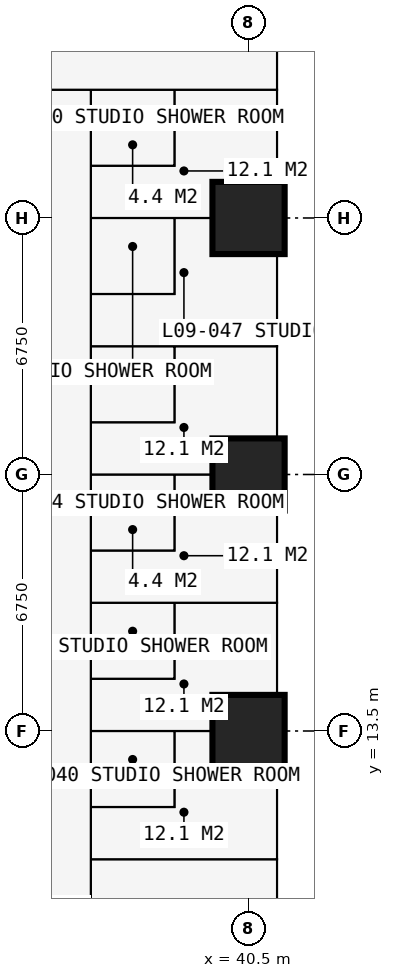
"""IFC4 building model, lengths in metres.
Left out: names, types, materials, properties, quantities, classifications, styles, units other than length and angle.
Written with IfcOpenShell. Run it as: python <this file> out.ifc"""

import sys

from ifc_helpers import new_model, si_unit, direction, frame, frame_2d, origin, origin_2d, place, context, subcontext, project, spatial, rectangle, extrude, element, fill, save


model = new_model("IFC4")
c1 = context("Model", 3, precision=1e-05, world=origin(), true_north=direction((0.0, 1.0)))
c2 = subcontext(c1, "Body", "Model", "MODEL_VIEW")
j1 = project(units=[si_unit("LENGTHUNIT", "METRE"), si_unit("PLANEANGLEUNIT", "RADIAN")], contexts=[c1])
p1 = place(None, origin())
s1 = spatial("IfcSite", under=j1, at=p1, CompositionType="ELEMENT")
p2 = place(p1, origin())
s2 = spatial("IfcBuilding", under=s1, at=p2, CompositionType="ELEMENT")
p3 = place(p2, frame((0.0, 0.0, 36.0)))
s3 = spatial("IfcBuildingStorey", under=s2, at=p3, CompositionType="ELEMENT", Elevation=36.0)
for number, where, z_axis, x_axis in (
    (1, (40.5, 13.5, 0.0), (0.0, 0.0, 1.0), (1.0, 0.0, 0.0)),
    (2, (40.5, 20.25, 0.0), (0.0, 0.0, 1.0), (1.0, 0.0, 0.0)),
    (3, (40.5, 27.0, 0.0), (0.0, 0.0, 1.0), (1.0, 0.0, 0.0)),
):
    element("IfcColumn", number, at=place(p3, frame(where, z_axis=z_axis, x_axis=x_axis)), inside=s3, PredefinedType="COLUMN", context=c2, shape_type="SweptSolid", body=[
        extrude(rectangle(XDim=1.9, YDim=1.9, at=origin_2d()), origin(), (0.0, 0.0, 1.0), 3.6),
    ])
p4 = place(p3, frame((41.25, 27.0, 0.0), z_axis=(0.0, 0.0, 1.0), x_axis=(0.0, -1.0, 0.0)))
e4 = element("IfcWall", 4, at=p4, inside=s3, PredefinedType="SOLIDWALL", context=c2, shape_type="SweptSolid", body=[
    extrude(rectangle(XDim=6.75, YDim=0.15, at=frame_2d((3.375, 0.0))), origin(), (0.0, 0.0, 1.0), 3.375),
])
p5 = place(p4, frame((0.996, 0.0, 0.0)))
e5 = element("IfcOpeningElement", 5, at=p5, cuts=e4, PredefinedType="OPENING", context=c2, shape_type="SweptSolid", body=[
    extrude(rectangle(XDim=1.0, YDim=2.2, at=frame_2d((0.5, 1.1))), frame((0.0, 0.085, 0.0), z_axis=(0.0, -1.0, 0.0), x_axis=(1.0, 0.0, 0.0)), (0.0, 0.0, 1.0), 0.17),
])
p6 = place(p4, frame((2.042, 0.0, 0.9)))
e6 = element("IfcOpeningElement", 6, at=p6, cuts=e4, PredefinedType="OPENING", context=c2, shape_type="SweptSolid", body=[
    extrude(rectangle(XDim=1.2, YDim=1.8, at=frame_2d((0.6, 0.9))), frame((0.0, 0.085, 0.0), z_axis=(0.0, -1.0, 0.0), x_axis=(1.0, 0.0, 0.0)), (0.0, 0.0, 1.0), 0.17),
])
p7 = place(p4, frame((4.754, 0.0, 0.0)))
e7 = element("IfcOpeningElement", 7, at=p7, cuts=e4, PredefinedType="OPENING", context=c2, shape_type="SweptSolid", body=[
    extrude(rectangle(XDim=1.0, YDim=2.2, at=frame_2d((0.5, 1.1))), frame((0.0, 0.085, 0.0), z_axis=(0.0, -1.0, 0.0), x_axis=(1.0, 0.0, 0.0)), (0.0, 0.0, 1.0), 0.17),
])
p8 = place(p4, frame((3.508, 0.0, 0.9)))
e8 = element("IfcOpeningElement", 8, at=p8, cuts=e4, PredefinedType="OPENING", context=c2, shape_type="SweptSolid", body=[
    extrude(rectangle(XDim=1.2, YDim=1.8, at=frame_2d((0.6, 0.9))), frame((0.0, 0.085, 0.0), z_axis=(0.0, -1.0, 0.0), x_axis=(1.0, 0.0, 0.0)), (0.0, 0.0, 1.0), 0.17),
])
p9 = place(p3, frame((41.35, 23.625, 0.0), z_axis=(0.0, 0.0, 1.0), x_axis=(1.0, 0.0, 0.0)))
e9 = element("IfcWall", 9, at=p9, inside=s3, PredefinedType="USERDEFINED", context=c2, shape_type="SweptSolid", body=[
    extrude(rectangle(XDim=2.2, YDim=1.0, at=frame_2d((1.1, 0.0))), origin(), (0.0, 0.0, 1.0), 0.9),
])
p10 = place(p3, frame((30.375, 30.375, 0.0), z_axis=(0.0, 0.0, 1.0), x_axis=(1.0, 0.0, 0.0)))
e10 = element("IfcWall", 10, at=p10, inside=s3, PredefinedType="PARTITIONING", context=c2, shape_type="SweptSolid", body=[
    extrude(rectangle(XDim=10.859, YDim=0.15, at=frame_2d((5.429, 0.0))), origin(), (0.0, 0.0, 1.0), 3.375),
])
p11 = place(p3, frame((36.35, 6.75, 0.0), z_axis=(0.0, 0.0, 1.0), x_axis=(0.0, 1.0, 0.0)))
e11 = element("IfcWall", 11, at=p11, inside=s3, PredefinedType="PARTITIONING", context=c2, shape_type="SweptSolid", body=[
    extrude(rectangle(XDim=23.625, YDim=0.1, at=frame_2d((11.812, 0.0))), origin(), (0.0, 0.0, 1.0), 3.375),
])
p12 = place(p11, frame((3.575, 0.0, 0.0)))
e12 = element("IfcOpeningElement", 12, at=p12, cuts=e11, PredefinedType="OPENING", context=c2, shape_type="SweptSolid", body=[
    extrude(rectangle(XDim=0.95, YDim=2.2, at=frame_2d((0.475, 1.1))), frame((0.0, 0.06, 0.0), z_axis=(0.0, -1.0, 0.0), x_axis=(1.0, 0.0, 0.0)), (0.0, 0.0, 1.0), 0.12),
])
p13 = place(p11, frame((7.0, 0.0, 0.0)))
e13 = element("IfcOpeningElement", 13, at=p13, cuts=e11, PredefinedType="OPENING", context=c2, shape_type="SweptSolid", body=[
    extrude(rectangle(XDim=0.95, YDim=2.2, at=frame_2d((0.475, 1.1))), frame((0.0, 0.06, 0.0), z_axis=(0.0, -1.0, 0.0), x_axis=(1.0, 0.0, 0.0)), (0.0, 0.0, 1.0), 0.12),
])
p14 = place(p11, frame((10.375, 0.0, 0.0)))
e14 = element("IfcOpeningElement", 14, at=p14, cuts=e11, PredefinedType="OPENING", context=c2, shape_type="SweptSolid", body=[
    extrude(rectangle(XDim=0.95, YDim=2.2, at=frame_2d((0.475, 1.1))), frame((0.0, 0.06, 0.0), z_axis=(0.0, -1.0, 0.0), x_axis=(1.0, 0.0, 0.0)), (0.0, 0.0, 1.0), 0.12),
])
p15 = place(p11, frame((13.75, 0.0, 0.0)))
e15 = element("IfcOpeningElement", 15, at=p15, cuts=e11, PredefinedType="OPENING", context=c2, shape_type="SweptSolid", body=[
    extrude(rectangle(XDim=0.95, YDim=2.2, at=frame_2d((0.475, 1.1))), frame((0.0, 0.06, 0.0), z_axis=(0.0, -1.0, 0.0), x_axis=(1.0, 0.0, 0.0)), (0.0, 0.0, 1.0), 0.12),
])
p16 = place(p11, frame((17.125, 0.0, 0.0)))
e16 = element("IfcOpeningElement", 16, at=p16, cuts=e11, PredefinedType="OPENING", context=c2, shape_type="SweptSolid", body=[
    extrude(rectangle(XDim=0.95, YDim=2.2, at=frame_2d((0.475, 1.1))), frame((0.0, 0.06, 0.0), z_axis=(0.0, -1.0, 0.0), x_axis=(1.0, 0.0, 0.0)), (0.0, 0.0, 1.0), 0.12),
])
p17 = place(p11, frame((20.5, 0.0, 0.0)))
e17 = element("IfcOpeningElement", 17, at=p17, cuts=e11, PredefinedType="OPENING", context=c2, shape_type="SweptSolid", body=[
    extrude(rectangle(XDim=0.95, YDim=2.2, at=frame_2d((0.475, 1.1))), frame((0.0, 0.06, 0.0), z_axis=(0.0, -1.0, 0.0), x_axis=(1.0, 0.0, 0.0)), (0.0, 0.0, 1.0), 0.12),
])
p18 = place(p3, frame((36.35, 10.125, 0.0), z_axis=(0.0, 0.0, 1.0), x_axis=(1.0, 0.0, 0.0)))
e18 = element("IfcWall", 18, at=p18, inside=s3, PredefinedType="PARTITIONING", context=c2, shape_type="SweptSolid", body=[
    extrude(rectangle(XDim=4.884, YDim=0.15, at=frame_2d((2.442, 0.0))), origin(), (0.0, 0.0, 1.0), 3.375),
])
p19 = place(p3, frame((36.35, 11.5, 0.0), z_axis=(0.0, 0.0, 1.0), x_axis=(1.0, 0.0, 0.0)))
e19 = element("IfcWall", 19, at=p19, inside=s3, PredefinedType="PARTITIONING", context=c2, shape_type="SweptSolid", body=[
    extrude(rectangle(XDim=2.2, YDim=0.1, at=frame_2d((1.1, 0.0))), origin(), (0.0, 0.0, 1.0), 3.375),
])
p20 = place(p19, frame((0.65, 0.0, 0.0)))
e20 = element("IfcOpeningElement", 20, at=p20, cuts=e19, PredefinedType="OPENING", context=c2, shape_type="SweptSolid", body=[
    extrude(rectangle(XDim=0.9, YDim=2.2, at=frame_2d((0.45, 1.1))), frame((0.0, 0.06, 0.0), z_axis=(0.0, -1.0, 0.0), x_axis=(1.0, 0.0, 0.0)), (0.0, 0.0, 1.0), 0.12),
])
p21 = place(p3, frame((36.35, 13.5, 0.0), z_axis=(0.0, 0.0, 1.0), x_axis=(1.0, 0.0, 0.0)))
e21 = element("IfcWall", 21, at=p21, inside=s3, PredefinedType="PARTITIONING", context=c2, shape_type="SweptSolid", body=[
    extrude(rectangle(XDim=4.884, YDim=0.175, at=frame_2d((2.442, 0.0))), origin(), (0.0, 0.0, 1.0), 2.61),
])
p22 = place(p3, frame((36.35, 14.875, 0.0), z_axis=(0.0, 0.0, 1.0), x_axis=(1.0, 0.0, 0.0)))
e22 = element("IfcWall", 22, at=p22, inside=s3, PredefinedType="PARTITIONING", context=c2, shape_type="SweptSolid", body=[
    extrude(rectangle(XDim=2.2, YDim=0.1, at=frame_2d((1.1, 0.0))), origin(), (0.0, 0.0, 1.0), 3.375),
])
p23 = place(p22, frame((0.65, 0.0, 0.0)))
e23 = element("IfcOpeningElement", 23, at=p23, cuts=e22, PredefinedType="OPENING", context=c2, shape_type="SweptSolid", body=[
    extrude(rectangle(XDim=0.9, YDim=2.2, at=frame_2d((0.45, 1.1))), frame((0.0, 0.06, 0.0), z_axis=(0.0, -1.0, 0.0), x_axis=(1.0, 0.0, 0.0)), (0.0, 0.0, 1.0), 0.12),
])
p24 = place(p3, frame((36.35, 16.875, 0.0), z_axis=(0.0, 0.0, 1.0), x_axis=(1.0, 0.0, 0.0)))
e24 = element("IfcWall", 24, at=p24, inside=s3, PredefinedType="PARTITIONING", context=c2, shape_type="SweptSolid", body=[
    extrude(rectangle(XDim=4.884, YDim=0.175, at=frame_2d((2.442, 0.0))), origin(), (0.0, 0.0, 1.0), 3.375),
])
p25 = place(p3, frame((36.35, 18.25, 0.0), z_axis=(0.0, 0.0, 1.0), x_axis=(1.0, 0.0, 0.0)))
e25 = element("IfcWall", 25, at=p25, inside=s3, PredefinedType="PARTITIONING", context=c2, shape_type="SweptSolid", body=[
    extrude(rectangle(XDim=2.2, YDim=0.1, at=frame_2d((1.1, 0.0))), origin(), (0.0, 0.0, 1.0), 3.375),
])
p26 = place(p25, frame((0.65, 0.0, 0.0)))
e26 = element("IfcOpeningElement", 26, at=p26, cuts=e25, PredefinedType="OPENING", context=c2, shape_type="SweptSolid", body=[
    extrude(rectangle(XDim=0.9, YDim=2.2, at=frame_2d((0.45, 1.1))), frame((0.0, 0.06, 0.0), z_axis=(0.0, -1.0, 0.0), x_axis=(1.0, 0.0, 0.0)), (0.0, 0.0, 1.0), 0.12),
])
p27 = place(p3, frame((36.35, 20.25, 0.0), z_axis=(0.0, 0.0, 1.0), x_axis=(1.0, 0.0, 0.0)))
e27 = element("IfcWall", 27, at=p27, inside=s3, PredefinedType="PARTITIONING", context=c2, shape_type="SweptSolid", body=[
    extrude(rectangle(XDim=4.884, YDim=0.175, at=frame_2d((2.442, 0.0))), origin(), (0.0, 0.0, 1.0), 2.61),
])
p28 = place(p3, frame((36.35, 21.625, 0.0), z_axis=(0.0, 0.0, 1.0), x_axis=(1.0, 0.0, 0.0)))
e28 = element("IfcWall", 28, at=p28, inside=s3, PredefinedType="PARTITIONING", context=c2, shape_type="SweptSolid", body=[
    extrude(rectangle(XDim=2.2, YDim=0.1, at=frame_2d((1.1, 0.0))), origin(), (0.0, 0.0, 1.0), 3.375),
])
p29 = place(p28, frame((0.65, 0.0, 0.0)))
e29 = element("IfcOpeningElement", 29, at=p29, cuts=e28, PredefinedType="OPENING", context=c2, shape_type="SweptSolid", body=[
    extrude(rectangle(XDim=0.9, YDim=2.2, at=frame_2d((0.45, 1.1))), frame((0.0, 0.06, 0.0), z_axis=(0.0, -1.0, 0.0), x_axis=(1.0, 0.0, 0.0)), (0.0, 0.0, 1.0), 0.12),
])
p30 = place(p3, frame((36.35, 23.625, 0.0), z_axis=(0.0, 0.0, 1.0), x_axis=(1.0, 0.0, 0.0)))
e30 = element("IfcWall", 30, at=p30, inside=s3, PredefinedType="PARTITIONING", context=c2, shape_type="SweptSolid", body=[
    extrude(rectangle(XDim=4.884, YDim=0.175, at=frame_2d((2.442, 0.0))), origin(), (0.0, 0.0, 1.0), 3.375),
])
p31 = place(p3, frame((36.35, 25.0, 0.0), z_axis=(0.0, 0.0, 1.0), x_axis=(1.0, 0.0, 0.0)))
e31 = element("IfcWall", 31, at=p31, inside=s3, PredefinedType="PARTITIONING", context=c2, shape_type="SweptSolid", body=[
    extrude(rectangle(XDim=2.2, YDim=0.1, at=frame_2d((1.1, 0.0))), origin(), (0.0, 0.0, 1.0), 3.375),
])
p32 = place(p31, frame((0.65, 0.0, 0.0)))
e32 = element("IfcOpeningElement", 32, at=p32, cuts=e31, PredefinedType="OPENING", context=c2, shape_type="SweptSolid", body=[
    extrude(rectangle(XDim=0.9, YDim=2.2, at=frame_2d((0.45, 1.1))), frame((0.0, 0.06, 0.0), z_axis=(0.0, -1.0, 0.0), x_axis=(1.0, 0.0, 0.0)), (0.0, 0.0, 1.0), 0.12),
])
p33 = place(p3, frame((36.35, 27.0, 0.0), z_axis=(0.0, 0.0, 1.0), x_axis=(1.0, 0.0, 0.0)))
e33 = element("IfcWall", 33, at=p33, inside=s3, PredefinedType="PARTITIONING", context=c2, shape_type="SweptSolid", body=[
    extrude(rectangle(XDim=4.884, YDim=0.175, at=frame_2d((2.442, 0.0))), origin(), (0.0, 0.0, 1.0), 2.877),
])
p34 = place(p3, frame((36.35, 28.375, 0.0), z_axis=(0.0, 0.0, 1.0), x_axis=(1.0, 0.0, 0.0)))
e34 = element("IfcWall", 34, at=p34, inside=s3, PredefinedType="PARTITIONING", context=c2, shape_type="SweptSolid", body=[
    extrude(rectangle(XDim=2.2, YDim=0.1, at=frame_2d((1.1, 0.0))), origin(), (0.0, 0.0, 1.0), 3.375),
])
p35 = place(p34, frame((0.65, 0.0, 0.0)))
e35 = element("IfcOpeningElement", 35, at=p35, cuts=e34, PredefinedType="OPENING", context=c2, shape_type="SweptSolid", body=[
    extrude(rectangle(XDim=0.9, YDim=2.2, at=frame_2d((0.45, 1.1))), frame((0.0, 0.06, 0.0), z_axis=(0.0, -1.0, 0.0), x_axis=(1.0, 0.0, 0.0)), (0.0, 0.0, 1.0), 0.12),
])
for number, where, z_axis, x_axis in (
    (36, (38.55, 11.5, 0.0), (0.0, 0.0, 1.0), (0.0, 1.0, 0.0)),
    (37, (38.55, 14.875, 0.0), (0.0, 0.0, 1.0), (0.0, 1.0, 0.0)),
    (38, (38.55, 18.25, 0.0), (0.0, 0.0, 1.0), (0.0, 1.0, 0.0)),
    (39, (38.55, 21.625, 0.0), (0.0, 0.0, 1.0), (0.0, 1.0, 0.0)),
    (40, (38.55, 25.0, 0.0), (0.0, 0.0, 1.0), (0.0, 1.0, 0.0)),
    (41, (38.55, 28.375, 0.0), (0.0, 0.0, 1.0), (0.0, 1.0, 0.0)),
):
    element("IfcWall", number, at=place(p3, frame(where, z_axis=z_axis, x_axis=x_axis)), inside=s3, PredefinedType="PARTITIONING", context=c2, shape_type="SweptSolid", body=[
        extrude(rectangle(XDim=2.0, YDim=0.1, at=frame_2d((1.0, 0.0))), origin(), (0.0, 0.0, 1.0), 3.375),
    ])
p36 = place(p5, origin())
e42 = element("IfcDoor", 42, at=p36, inside=s3, OperationType="SINGLE_SWING_LEFT", PredefinedType="DOOR", context=c2, shape_type="SweptSolid", body=[
    extrude(rectangle(XDim=1.0, YDim=2.2, at=frame_2d((0.5, 1.1))), frame((0.0, 0.025, 0.0), z_axis=(0.0, -1.0, 0.0), x_axis=(1.0, 0.0, 0.0)), (0.0, 0.0, 1.0), 0.05),
])
fill(e5, e42)
p37 = place(p6, origin())
e43 = element("IfcWindow", 43, at=p37, inside=s3, PartitioningType="SINGLE_PANEL", PredefinedType="WINDOW", context=c2, shape_type="SweptSolid", body=[
    extrude(rectangle(XDim=1.2, YDim=1.8, at=frame_2d((0.6, 0.9))), frame((0.0, 0.03, 0.0), z_axis=(0.0, -1.0, 0.0), x_axis=(1.0, 0.0, 0.0)), (0.0, 0.0, 1.0), 0.06),
])
fill(e6, e43)
p38 = place(p7, origin())
e44 = element("IfcDoor", 44, at=p38, inside=s3, OperationType="SINGLE_SWING_RIGHT", PredefinedType="DOOR", context=c2, shape_type="SweptSolid", body=[
    extrude(rectangle(XDim=1.0, YDim=2.2, at=frame_2d((0.5, 1.1))), frame((0.0, 0.025, 0.0), z_axis=(0.0, -1.0, 0.0), x_axis=(1.0, 0.0, 0.0)), (0.0, 0.0, 1.0), 0.05),
])
fill(e7, e44)
p39 = place(p8, origin())
e45 = element("IfcWindow", 45, at=p39, inside=s3, PartitioningType="SINGLE_PANEL", PredefinedType="WINDOW", context=c2, shape_type="SweptSolid", body=[
    extrude(rectangle(XDim=1.2, YDim=1.8, at=frame_2d((0.6, 0.9))), frame((0.0, 0.03, 0.0), z_axis=(0.0, -1.0, 0.0), x_axis=(1.0, 0.0, 0.0)), (0.0, 0.0, 1.0), 0.06),
])
fill(e8, e45)
p40 = place(p12, origin())
e46 = element("IfcDoor", 46, at=p40, inside=s3, OperationType="SINGLE_SWING_LEFT", PredefinedType="DOOR", context=c2, shape_type="SweptSolid", body=[
    extrude(rectangle(XDim=0.95, YDim=2.2, at=frame_2d((0.475, 1.1))), frame((0.0, 0.025, 0.0), z_axis=(0.0, -1.0, 0.0), x_axis=(1.0, 0.0, 0.0)), (0.0, 0.0, 1.0), 0.05),
])
fill(e12, e46)
p41 = place(p20, origin())
e47 = element("IfcDoor", 47, at=p41, inside=s3, OperationType="SINGLE_SWING_RIGHT", PredefinedType="DOOR", context=c2, shape_type="SweptSolid", body=[
    extrude(rectangle(XDim=0.9, YDim=2.2, at=frame_2d((0.45, 1.1))), frame((0.0, 0.025, 0.0), z_axis=(0.0, -1.0, 0.0), x_axis=(1.0, 0.0, 0.0)), (0.0, 0.0, 1.0), 0.05),
])
fill(e20, e47)
p42 = place(p13, origin())
e48 = element("IfcDoor", 48, at=p42, inside=s3, OperationType="SINGLE_SWING_LEFT", PredefinedType="DOOR", context=c2, shape_type="SweptSolid", body=[
    extrude(rectangle(XDim=0.95, YDim=2.2, at=frame_2d((0.475, 1.1))), frame((0.0, 0.025, 0.0), z_axis=(0.0, -1.0, 0.0), x_axis=(1.0, 0.0, 0.0)), (0.0, 0.0, 1.0), 0.05),
])
fill(e13, e48)
p43 = place(p23, origin())
e49 = element("IfcDoor", 49, at=p43, inside=s3, OperationType="SINGLE_SWING_RIGHT", PredefinedType="DOOR", context=c2, shape_type="SweptSolid", body=[
    extrude(rectangle(XDim=0.9, YDim=2.2, at=frame_2d((0.45, 1.1))), frame((0.0, 0.025, 0.0), z_axis=(0.0, -1.0, 0.0), x_axis=(1.0, 0.0, 0.0)), (0.0, 0.0, 1.0), 0.05),
])
fill(e23, e49)
p44 = place(p14, origin())
e50 = element("IfcDoor", 50, at=p44, inside=s3, OperationType="SINGLE_SWING_LEFT", PredefinedType="DOOR", context=c2, shape_type="SweptSolid", body=[
    extrude(rectangle(XDim=0.95, YDim=2.2, at=frame_2d((0.475, 1.1))), frame((0.0, 0.025, 0.0), z_axis=(0.0, -1.0, 0.0), x_axis=(1.0, 0.0, 0.0)), (0.0, 0.0, 1.0), 0.05),
])
fill(e14, e50)
p45 = place(p26, origin())
e51 = element("IfcDoor", 51, at=p45, inside=s3, OperationType="SINGLE_SWING_RIGHT", PredefinedType="DOOR", context=c2, shape_type="SweptSolid", body=[
    extrude(rectangle(XDim=0.9, YDim=2.2, at=frame_2d((0.45, 1.1))), frame((0.0, 0.025, 0.0), z_axis=(0.0, -1.0, 0.0), x_axis=(1.0, 0.0, 0.0)), (0.0, 0.0, 1.0), 0.05),
])
fill(e26, e51)
p46 = place(p15, origin())
e52 = element("IfcDoor", 52, at=p46, inside=s3, OperationType="SINGLE_SWING_LEFT", PredefinedType="DOOR", context=c2, shape_type="SweptSolid", body=[
    extrude(rectangle(XDim=0.95, YDim=2.2, at=frame_2d((0.475, 1.1))), frame((0.0, 0.025, 0.0), z_axis=(0.0, -1.0, 0.0), x_axis=(1.0, 0.0, 0.0)), (0.0, 0.0, 1.0), 0.05),
])
fill(e15, e52)
p47 = place(p29, origin())
e53 = element("IfcDoor", 53, at=p47, inside=s3, OperationType="SINGLE_SWING_RIGHT", PredefinedType="DOOR", context=c2, shape_type="SweptSolid", body=[
    extrude(rectangle(XDim=0.9, YDim=2.2, at=frame_2d((0.45, 1.1))), frame((0.0, 0.025, 0.0), z_axis=(0.0, -1.0, 0.0), x_axis=(1.0, 0.0, 0.0)), (0.0, 0.0, 1.0), 0.05),
])
fill(e29, e53)
p48 = place(p16, origin())
e54 = element("IfcDoor", 54, at=p48, inside=s3, OperationType="SINGLE_SWING_LEFT", PredefinedType="DOOR", context=c2, shape_type="SweptSolid", body=[
    extrude(rectangle(XDim=0.95, YDim=2.2, at=frame_2d((0.475, 1.1))), frame((0.0, 0.025, 0.0), z_axis=(0.0, -1.0, 0.0), x_axis=(1.0, 0.0, 0.0)), (0.0, 0.0, 1.0), 0.05),
])
fill(e16, e54)
p49 = place(p32, origin())
e55 = element("IfcDoor", 55, at=p49, inside=s3, OperationType="SINGLE_SWING_RIGHT", PredefinedType="DOOR", context=c2, shape_type="SweptSolid", body=[
    extrude(rectangle(XDim=0.9, YDim=2.2, at=frame_2d((0.45, 1.1))), frame((0.0, 0.025, 0.0), z_axis=(0.0, -1.0, 0.0), x_axis=(1.0, 0.0, 0.0)), (0.0, 0.0, 1.0), 0.05),
])
fill(e32, e55)
p50 = place(p17, origin())
e56 = element("IfcDoor", 56, at=p50, inside=s3, OperationType="SINGLE_SWING_LEFT", PredefinedType="DOOR", context=c2, shape_type="SweptSolid", body=[
    extrude(rectangle(XDim=0.95, YDim=2.2, at=frame_2d((0.475, 1.1))), frame((0.0, 0.025, 0.0), z_axis=(0.0, -1.0, 0.0), x_axis=(1.0, 0.0, 0.0)), (0.0, 0.0, 1.0), 0.05),
])
fill(e17, e56)
p51 = place(p35, origin())
e57 = element("IfcDoor", 57, at=p51, inside=s3, OperationType="SINGLE_SWING_RIGHT", PredefinedType="DOOR", context=c2, shape_type="SweptSolid", body=[
    extrude(rectangle(XDim=0.9, YDim=2.2, at=frame_2d((0.45, 1.1))), frame((0.0, 0.025, 0.0), z_axis=(0.0, -1.0, 0.0), x_axis=(1.0, 0.0, 0.0)), (0.0, 0.0, 1.0), 0.05),
])
fill(e35, e57)
save(model, sys.argv[1])
